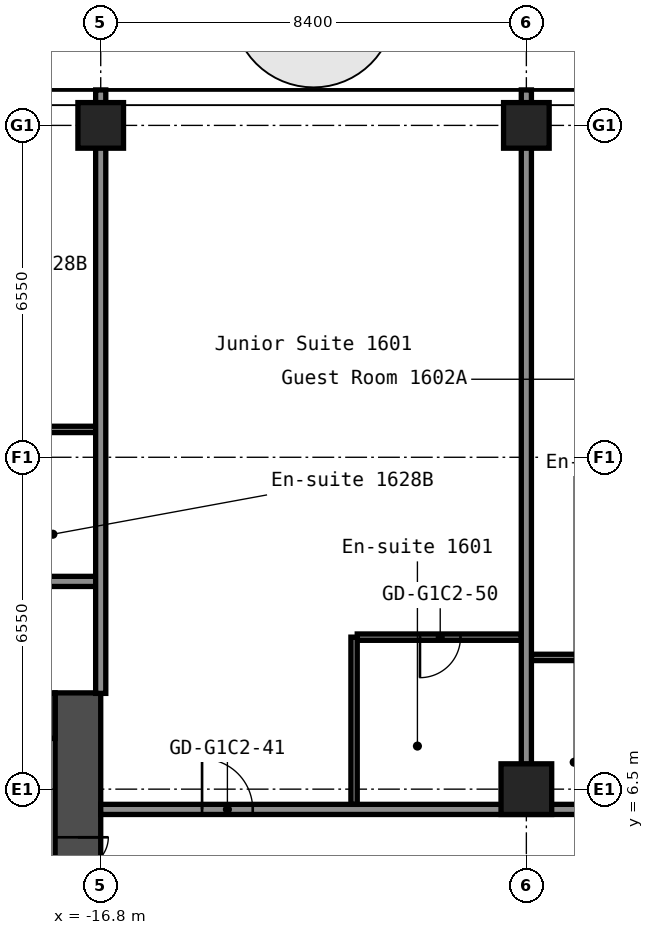
"""IFC4 building model, lengths in metres.
Left out: names, types, materials, properties, quantities, classifications, styles, units other than length and angle.
Written with IfcOpenShell. Run it as: python <this file> out.ifc"""

import sys

from ifc_helpers import new_model, si_unit, direction, frame, frame_2d, origin, origin_2d, place, context, subcontext, project, spatial, rectangle, hollow_rectangle, extrude, element, fill, save


model = new_model("IFC4")
c1 = context("Model", 3, precision=1e-05, world=origin(), true_north=direction((0.0, 1.0)))
c2 = subcontext(c1, "Body", "Model", "MODEL_VIEW")
j1 = project(units=[si_unit("LENGTHUNIT", "METRE"), si_unit("PLANEANGLEUNIT", "RADIAN")], contexts=[c1])
p1 = place(None, origin())
s1 = spatial("IfcSite", under=j1, at=p1, CompositionType="ELEMENT")
p2 = place(p1, origin())
s2 = spatial("IfcBuilding", under=s1, at=p2, CompositionType="ELEMENT")
p3 = place(p2, frame((0.0, 0.0, 58.2)))
s3 = spatial("IfcBuildingStorey", under=s2, at=p3, CompositionType="ELEMENT", Elevation=58.2)
p4 = place(p3, frame((-16.8, 19.6, 0.0), z_axis=(0.0, 0.0, 1.0), x_axis=(1.0, 0.0, 0.0)))
e1 = element("IfcColumn", 1, at=p4, inside=s3, PredefinedType="COLUMN", context=c2, shape_type="SweptSolid", body=[
    extrude(hollow_rectangle(XDim=0.9, YDim=0.9, WallThickness=0.036, at=origin_2d()), origin(), (0.0, 0.0, 1.0), 2.8),
])
p5 = place(p3, frame((-8.4, 6.5, 0.0), z_axis=(0.0, 0.0, 1.0), x_axis=(1.0, 0.0, 0.0)))
e2 = element("IfcColumn", 2, at=p5, inside=s3, PredefinedType="COLUMN", context=c2, shape_type="SweptSolid", body=[
    extrude(hollow_rectangle(XDim=1.0, YDim=1.0, WallThickness=0.04, at=origin_2d()), origin(), (0.0, 0.0, 1.0), 2.8),
])
p6 = place(p3, frame((-8.4, 19.6, 0.0), z_axis=(0.0, 0.0, 1.0), x_axis=(1.0, 0.0, 0.0)))
e3 = element("IfcColumn", 3, at=p6, inside=s3, PredefinedType="COLUMN", context=c2, shape_type="SweptSolid", body=[
    extrude(hollow_rectangle(XDim=0.9, YDim=0.9, WallThickness=0.036, at=origin_2d()), origin(), (0.0, 0.0, 1.0), 2.8),
])
p7 = place(p3, frame((-17.25, -8.4, 0.0), z_axis=(0.0, 0.0, 1.0), x_axis=(0.0, 1.0, 0.0)))
e4 = element("IfcWall", 4, at=p7, inside=s3, PredefinedType="SHEAR", context=c2, shape_type="SweptSolid", body=[
    extrude(rectangle(XDim=16.8, YDim=0.9, at=frame_2d((8.4, 0.0))), origin(), (0.0, 0.0, 1.0), 2.8),
])
p8 = place(p7, frame((12.75, 0.0, 0.0)))
e5 = element("IfcOpeningElement", 5, at=p8, cuts=e4, PredefinedType="OPENING", context=c2, shape_type="SweptSolid", body=[
    extrude(rectangle(XDim=1.2, YDim=2.1, at=frame_2d((0.6, 1.05))), frame((0.0, 0.46, 0.0), z_axis=(0.0, -1.0, 0.0), x_axis=(1.0, 0.0, 0.0)), (0.0, 0.0, 1.0), 0.92),
])
p9 = place(p7, frame((2.85, 0.0, 0.0)))
e6 = element("IfcOpeningElement", 6, at=p9, cuts=e4, PredefinedType="OPENING", context=c2, shape_type="SweptSolid", body=[
    extrude(rectangle(XDim=1.2, YDim=2.1, at=frame_2d((0.6, 1.05))), frame((0.0, 0.46, 0.0), z_axis=(0.0, -1.0, 0.0), x_axis=(1.0, 0.0, 0.0)), (0.0, 0.0, 1.0), 0.92),
])
p10 = place(p3, frame((-32.7, 7.95, 0.0), z_axis=(0.0, 0.0, 1.0), x_axis=(1.0, 0.0, 0.0)))
e7 = element("IfcWall", 7, at=p10, inside=s3, PredefinedType="SHEAR", context=c2, shape_type="SweptSolid", body=[
    extrude(rectangle(XDim=15.0, YDim=0.9, at=frame_2d((7.5, 0.0))), origin(), (0.0, 0.0, 1.0), 2.8),
])
p11 = place(p10, frame((3.4, 0.0, 0.0)))
e8 = element("IfcOpeningElement", 8, at=p11, cuts=e7, PredefinedType="OPENING", context=c2, shape_type="SweptSolid", body=[
    extrude(rectangle(XDim=1.2, YDim=2.1, at=frame_2d((0.6, 1.05))), frame((0.0, 0.46, 0.0), z_axis=(0.0, -1.0, 0.0), x_axis=(1.0, 0.0, 0.0)), (0.0, 0.0, 1.0), 0.92),
])
p12 = place(p10, frame((0.75, 0.0, 0.0)))
e9 = element("IfcOpeningElement", 9, at=p12, cuts=e7, PredefinedType="OPENING", context=c2, shape_type="SweptSolid", body=[
    extrude(rectangle(XDim=0.9, YDim=2.1, at=frame_2d((0.45, 1.05))), frame((0.0, 0.46, 0.0), z_axis=(0.0, -1.0, 0.0), x_axis=(1.0, 0.0, 0.0)), (0.0, 0.0, 1.0), 0.92),
])
p13 = place(p3, frame((-16.8, 6.1, 0.0), z_axis=(0.0, 0.0, 1.0), x_axis=(1.0, 0.0, 0.0)))
e10 = element("IfcWall", 10, at=p13, inside=s3, PredefinedType="PARTITIONING", context=c2, shape_type="SweptSolid", body=[
    extrude(rectangle(XDim=33.6, YDim=0.2, at=frame_2d((16.8, 0.0))), origin(), (0.0, 0.0, 1.0), 2.8),
])
p14 = place(p13, frame((2.0, 0.0, 0.0)))
e11 = element("IfcOpeningElement", 11, at=p14, cuts=e10, PredefinedType="OPENING", context=c2, shape_type="SweptSolid", body=[
    extrude(rectangle(XDim=1.0, YDim=2.1, at=frame_2d((0.5, 1.05))), frame((0.0, 0.11, 0.0), z_axis=(0.0, -1.0, 0.0), x_axis=(1.0, 0.0, 0.0)), (0.0, 0.0, 1.0), 0.22),
])
p15 = place(p13, frame((11.25, 0.0, 0.0)))
e12 = element("IfcOpeningElement", 12, at=p15, cuts=e10, PredefinedType="OPENING", context=c2, shape_type="SweptSolid", body=[
    extrude(rectangle(XDim=1.0, YDim=2.1, at=frame_2d((0.5, 1.05))), frame((0.0, 0.11, 0.0), z_axis=(0.0, -1.0, 0.0), x_axis=(1.0, 0.0, 0.0)), (0.0, 0.0, 1.0), 0.22),
])
p16 = place(p13, frame((12.95, 0.0, 0.0)))
e13 = element("IfcOpeningElement", 13, at=p16, cuts=e10, PredefinedType="OPENING", context=c2, shape_type="SweptSolid", body=[
    extrude(rectangle(XDim=1.0, YDim=2.1, at=frame_2d((0.5, 1.05))), frame((0.0, 0.11, 0.0), z_axis=(0.0, -1.0, 0.0), x_axis=(1.0, 0.0, 0.0)), (0.0, 0.0, 1.0), 0.22),
])
p17 = place(p13, frame((20.5, 0.0, 0.0)))
e14 = element("IfcOpeningElement", 14, at=p17, cuts=e10, PredefinedType="OPENING", context=c2, shape_type="SweptSolid", body=[
    extrude(rectangle(XDim=1.0, YDim=2.1, at=frame_2d((0.5, 1.05))), frame((0.0, 0.11, 0.0), z_axis=(0.0, -1.0, 0.0), x_axis=(1.0, 0.0, 0.0)), (0.0, 0.0, 1.0), 0.22),
])
p18 = place(p13, frame((28.05, 0.0, 0.0)))
e15 = element("IfcOpeningElement", 15, at=p18, cuts=e10, PredefinedType="OPENING", context=c2, shape_type="SweptSolid", body=[
    extrude(rectangle(XDim=1.0, YDim=2.1, at=frame_2d((0.5, 1.05))), frame((0.0, 0.11, 0.0), z_axis=(0.0, -1.0, 0.0), x_axis=(1.0, 0.0, 0.0)), (0.0, 0.0, 1.0), 0.22),
])
p19 = place(p13, frame((29.75, 0.0, 0.0)))
e16 = element("IfcOpeningElement", 16, at=p19, cuts=e10, PredefinedType="OPENING", context=c2, shape_type="SweptSolid", body=[
    extrude(rectangle(XDim=1.0, YDim=2.1, at=frame_2d((0.5, 1.05))), frame((0.0, 0.11, 0.0), z_axis=(0.0, -1.0, 0.0), x_axis=(1.0, 0.0, 0.0)), (0.0, 0.0, 1.0), 0.22),
])
p20 = place(p3, frame((-8.3, 9.1, 0.0), z_axis=(0.0, 0.0, 1.0), x_axis=(1.0, 0.0, 0.0)))
e17 = element("IfcWall", 17, at=p20, inside=s3, PredefinedType="PARTITIONING", context=c2, shape_type="SweptSolid", body=[
    extrude(rectangle(XDim=2.338, YDim=0.125, at=frame_2d((1.169, 0.0))), origin(), (0.0, 0.0, 1.0), 2.8),
])
p21 = place(p3, frame((-11.738, 9.5, 0.0), z_axis=(0.0, 0.0, 1.0), x_axis=(1.0, 0.0, 0.0)))
e18 = element("IfcWall", 18, at=p21, inside=s3, PredefinedType="PARTITIONING", context=c2, shape_type="SweptSolid", body=[
    extrude(rectangle(XDim=3.238, YDim=0.125, at=frame_2d((1.619, 0.0))), origin(), (0.0, 0.0, 1.0), 2.8),
])
p22 = place(p21, frame((1.238, 0.0, 0.0)))
e19 = element("IfcOpeningElement", 19, at=p22, cuts=e18, PredefinedType="OPENING", context=c2, shape_type="SweptSolid", body=[
    extrude(rectangle(XDim=0.8, YDim=2.1, at=frame_2d((0.4, 1.05))), frame((0.0, 0.073, 0.0), z_axis=(0.0, -1.0, 0.0), x_axis=(1.0, 0.0, 0.0)), (0.0, 0.0, 1.0), 0.145),
])
p23 = place(p3, frame((-51.1, 10.6, 0.0), z_axis=(0.0, 0.0, 1.0), x_axis=(1.0, 0.0, 0.0)))
e20 = element("IfcWall", 20, at=p23, inside=s3, PredefinedType="PARTITIONING", context=c2, shape_type="SweptSolid", body=[
    extrude(rectangle(XDim=34.3, YDim=0.2, at=frame_2d((17.15, 0.0))), origin(), (0.0, 0.0, 1.0), 2.8),
])
p24 = place(p23, frame((5.9, 0.0, 0.0)))
e21 = element("IfcOpeningElement", 21, at=p24, cuts=e20, PredefinedType="OPENING", context=c2, shape_type="SweptSolid", body=[
    extrude(rectangle(XDim=1.0, YDim=2.1, at=frame_2d((0.5, 1.05))), frame((0.0, 0.11, 0.0), z_axis=(0.0, -1.0, 0.0), x_axis=(1.0, 0.0, 0.0)), (0.0, 0.0, 1.0), 0.22),
])
p25 = place(p23, frame((11.0, 0.0, 0.0)))
e22 = element("IfcOpeningElement", 22, at=p25, cuts=e20, PredefinedType="OPENING", context=c2, shape_type="SweptSolid", body=[
    extrude(rectangle(XDim=1.0, YDim=2.1, at=frame_2d((0.5, 1.05))), frame((0.0, 0.11, 0.0), z_axis=(0.0, -1.0, 0.0), x_axis=(1.0, 0.0, 0.0)), (0.0, 0.0, 1.0), 0.22),
])
p26 = place(p23, frame((22.9, 0.0, 0.0)))
e23 = element("IfcOpeningElement", 23, at=p26, cuts=e20, PredefinedType="OPENING", context=c2, shape_type="SweptSolid", body=[
    extrude(rectangle(XDim=1.0, YDim=2.1, at=frame_2d((0.5, 1.05))), frame((0.0, 0.11, 0.0), z_axis=(0.0, -1.0, 0.0), x_axis=(1.0, 0.0, 0.0)), (0.0, 0.0, 1.0), 0.22),
])
p27 = place(p23, frame((28.75, 0.0, 0.0)))
e24 = element("IfcOpeningElement", 24, at=p27, cuts=e20, PredefinedType="OPENING", context=c2, shape_type="SweptSolid", body=[
    extrude(rectangle(XDim=1.0, YDim=2.1, at=frame_2d((0.5, 1.05))), frame((0.0, 0.11, 0.0), z_axis=(0.0, -1.0, 0.0), x_axis=(1.0, 0.0, 0.0)), (0.0, 0.0, 1.0), 0.22),
])
p28 = place(p23, frame((30.45, 0.0, 0.0)))
e25 = element("IfcOpeningElement", 25, at=p28, cuts=e20, PredefinedType="OPENING", context=c2, shape_type="SweptSolid", body=[
    extrude(rectangle(XDim=1.0, YDim=2.1, at=frame_2d((0.5, 1.05))), frame((0.0, 0.11, 0.0), z_axis=(0.0, -1.0, 0.0), x_axis=(1.0, 0.0, 0.0)), (0.0, 0.0, 1.0), 0.22),
])
p29 = place(p3, frame((-19.238, 13.6, 0.0), z_axis=(0.0, 0.0, 1.0), x_axis=(1.0, 0.0, 0.0)))
e26 = element("IfcWall", 26, at=p29, inside=s3, PredefinedType="PARTITIONING", context=c2, shape_type="SweptSolid", body=[
    extrude(rectangle(XDim=2.338, YDim=0.125, at=frame_2d((1.169, 0.0))), origin(), (0.0, 0.0, 1.0), 2.8),
])
p30 = place(p3, frame((-16.8, 8.39, 0.0), z_axis=(0.0, 0.0, 1.0), x_axis=(0.0, 1.0, 0.0)))
e27 = element("IfcWall", 27, at=p30, inside=s3, PredefinedType="PARTITIONING", context=c2, shape_type="SweptSolid", body=[
    extrude(rectangle(XDim=11.91, YDim=0.2, at=frame_2d((5.955, 0.0))), origin(), (0.0, 0.0, 1.0), 2.8),
])
p31 = place(p3, frame((-11.8, 6.2, 0.0), z_axis=(0.0, 0.0, 1.0), x_axis=(0.0, 1.0, 0.0)))
e28 = element("IfcWall", 28, at=p31, inside=s3, PredefinedType="PARTITIONING", context=c2, shape_type="SweptSolid", body=[
    extrude(rectangle(XDim=3.3, YDim=0.125, at=frame_2d((1.65, 0.0))), origin(), (0.0, 0.0, 1.0), 2.8),
])
p32 = place(p3, frame((-8.4, 6.99, 0.0), z_axis=(0.0, 0.0, 1.0), x_axis=(0.0, 1.0, 0.0)))
e29 = element("IfcWall", 29, at=p32, inside=s3, PredefinedType="PARTITIONING", context=c2, shape_type="SweptSolid", body=[
    extrude(rectangle(XDim=13.31, YDim=0.2, at=frame_2d((6.655, 0.0))), origin(), (0.0, 0.0, 1.0), 2.8),
])
p33 = place(p8, origin())
e30 = element("IfcDoor", 30, at=p33, inside=s3, OperationType="DOUBLE_DOOR_SINGLE_SWING", PredefinedType="DOOR", context=c2, shape_type="SweptSolid", body=[
    extrude(rectangle(XDim=1.2, YDim=2.1, at=frame_2d((0.6, 1.05))), frame((0.0, 0.025, 0.0), z_axis=(0.0, -1.0, 0.0), x_axis=(1.0, 0.0, 0.0)), (0.0, 0.0, 1.0), 0.05),
])
fill(e5, e30)
p34 = place(p14, origin())
e31 = element("IfcDoor", 31, at=p34, inside=s3, OperationType="SINGLE_SWING_RIGHT", PredefinedType="DOOR", context=c2, shape_type="SweptSolid", body=[
    extrude(rectangle(XDim=1.0, YDim=2.1, at=frame_2d((0.5, 1.05))), frame((0.0, 0.025, 0.0), z_axis=(0.0, -1.0, 0.0), x_axis=(1.0, 0.0, 0.0)), (0.0, 0.0, 1.0), 0.05),
])
fill(e11, e31)
p35 = place(p22, origin())
e32 = element("IfcDoor", 32, at=p35, inside=s3, OperationType="SINGLE_SWING_LEFT", PredefinedType="DOOR", context=c2, shape_type="SweptSolid", body=[
    extrude(rectangle(XDim=0.8, YDim=2.1, at=frame_2d((0.4, 1.05))), frame((0.0, 0.025, 0.0), z_axis=(0.0, -1.0, 0.0), x_axis=(1.0, 0.0, 0.0)), (0.0, 0.0, 1.0), 0.05),
])
fill(e19, e32)
save(model, sys.argv[1])
